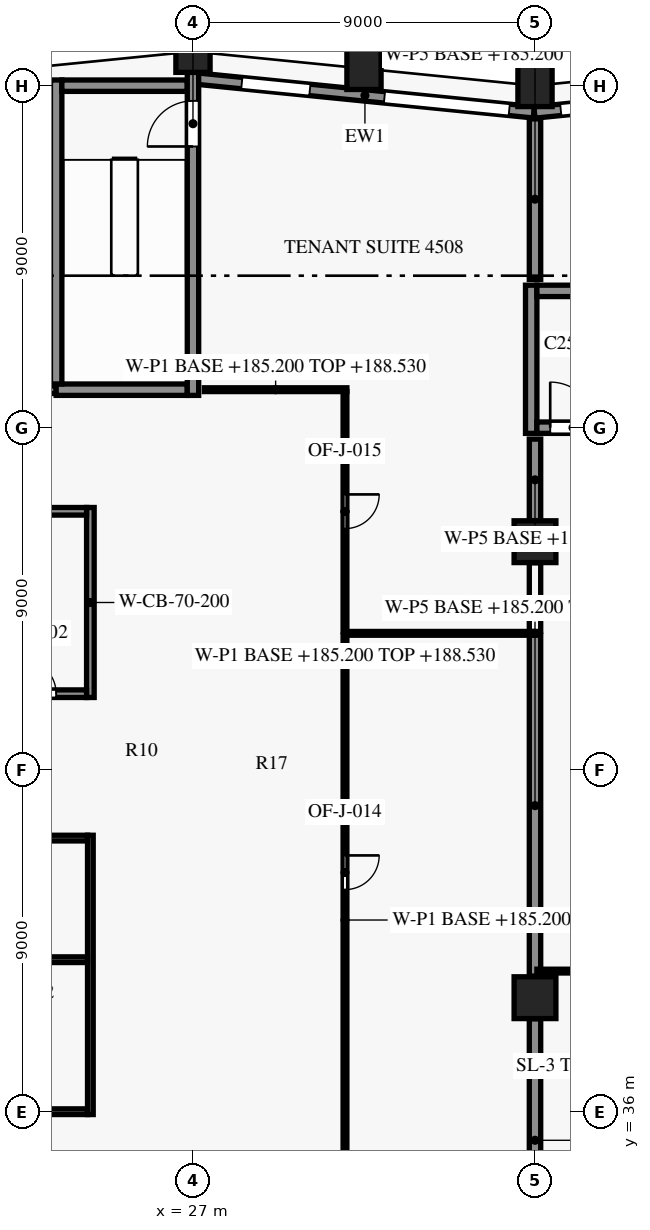
"""IFC4 building model, lengths in metres.
Left out: names, types, materials, properties, quantities, classifications, styles, units other than length and angle.
Written with IfcOpenShell. Run it as: python <this file> out.ifc"""

import sys

from ifc_helpers import new_model, si_unit, direction, frame, frame_2d, origin, origin_2d, place, context, subcontext, project, spatial, rectangle, extrude, element, fill, save


model = new_model("IFC4")
c1 = context("Model", 3, precision=1e-05, world=origin(), true_north=direction((0.0, 1.0)))
c2 = subcontext(c1, "Body", "Model", "MODEL_VIEW")
j1 = project(units=[si_unit("LENGTHUNIT", "METRE"), si_unit("PLANEANGLEUNIT", "RADIAN")], contexts=[c1])
p1 = place(None, origin())
s1 = spatial("IfcSite", under=j1, at=p1, CompositionType="ELEMENT")
p2 = place(p1, origin())
s2 = spatial("IfcBuilding", under=s1, at=p2, CompositionType="ELEMENT")
p3 = place(p2, frame((0.0, 0.0, 185.2)))
s3 = spatial("IfcBuildingStorey", under=s2, at=p3, CompositionType="ELEMENT", Elevation=185.2)
for number, where, z_axis, x_axis in (
    (1, (36.0, 63.0, 0.0), (0.0, 0.0, 1.0), (-1.0, 0.0, 0.0)),
    (2, (31.5, 63.45, 0.0), (0.0, 0.0, 1.0), (-0.995, 0.1, 0.0)),
    (3, (27.0, 63.9, 0.0), (0.0, 0.0, 1.0), (-1.0, 0.0, 0.0)),
):
    element("IfcColumn", number, at=place(p3, frame(where, z_axis=z_axis, x_axis=x_axis)), inside=s3, PredefinedType="COLUMN", context=c2, shape_type="SweptSolid", body=[
        extrude(rectangle(XDim=0.9, YDim=1.1, at=origin_2d()), origin(), (0.0, 0.0, 1.0), 3.8),
    ])
for number, where, z_axis, x_axis in (
    (4, (36.0, 39.0, 0.0), (0.0, 0.0, 1.0), (1.0, 0.0, 0.0)),
    (5, (36.0, 51.0, 0.0), (0.0, 0.0, 1.0), (1.0, 0.0, 0.0)),
):
    element("IfcColumn", number, at=place(p3, frame(where, z_axis=z_axis, x_axis=x_axis)), inside=s3, PredefinedType="COLUMN", context=c2, shape_type="SweptSolid", body=[
        extrude(rectangle(XDim=1.1, YDim=1.1, at=origin_2d()), origin(), (0.0, 0.0, 1.0), 3.8),
    ])
p4 = place(p3, frame((35.985, 62.295, 0.0), z_axis=(0.0, 0.0, 1.0), x_axis=(0.995035316196, 0.099522457379, 0.0)))
e6 = element("IfcWall", 6, at=p4, inside=s3, PredefinedType="SOLIDWALL", context=c2, shape_type="SweptSolid", body=[
    extrude(rectangle(XDim=9.03, YDim=0.3, at=frame_2d((4.515, 0.0))), origin(), (0.0, 0.0, 1.0), 3.15),
])
p5 = place(p4, frame((0.696, 0.0, 0.15)))
e7 = element("IfcOpeningElement", 7, at=p5, cuts=e6, PredefinedType="OPENING", context=c2, shape_type="SweptSolid", body=[
    extrude(rectangle(XDim=3.3, YDim=2.4, at=frame_2d((1.65, 1.2))), frame((0.0, 0.16, 0.0), z_axis=(0.0, -1.0, 0.0), x_axis=(1.0, 0.0, 0.0)), (0.0, 0.0, 1.0), 0.32),
])
p6 = place(p4, frame((5.969, 0.0, 0.75)))
e8 = element("IfcOpeningElement", 8, at=p6, cuts=e6, PredefinedType="OPENING", context=c2, shape_type="SweptSolid", body=[
    extrude(rectangle(XDim=1.8, YDim=1.8, at=frame_2d((0.9, 0.9))), frame((0.0, 0.16, 0.0), z_axis=(0.0, -1.0, 0.0), x_axis=(1.0, 0.0, 0.0)), (0.0, 0.0, 1.0), 0.32),
])
p7 = place(p3, frame((27.08, 63.189, 0.0), z_axis=(0.0, 0.0, 1.0), x_axis=(0.995036108007, -0.099514540459, 0.0)))
e9 = element("IfcWall", 9, at=p7, inside=s3, PredefinedType="SOLIDWALL", context=c2, shape_type="SweptSolid", body=[
    extrude(rectangle(XDim=8.935, YDim=0.3, at=frame_2d((4.468, 0.0))), origin(), (0.0, 0.0, 1.0), 3.15),
])
p8 = place(p7, frame((1.211, 0.0, 0.75)))
e10 = element("IfcOpeningElement", 10, at=p8, cuts=e9, PredefinedType="OPENING", context=c2, shape_type="SweptSolid", body=[
    extrude(rectangle(XDim=1.8, YDim=1.8, at=frame_2d((0.9, 0.9))), frame((0.0, 0.16, 0.0), z_axis=(0.0, -1.0, 0.0), x_axis=(1.0, 0.0, 0.0)), (0.0, 0.0, 1.0), 0.32),
])
p9 = place(p7, frame((4.984, 0.0, 0.15)))
e11 = element("IfcOpeningElement", 11, at=p9, cuts=e9, PredefinedType="OPENING", context=c2, shape_type="SweptSolid", body=[
    extrude(rectangle(XDim=3.3, YDim=2.4, at=frame_2d((1.65, 1.2))), frame((0.0, 0.16, 0.0), z_axis=(0.0, -1.0, 0.0), x_axis=(1.0, 0.0, 0.0)), (0.0, 0.0, 1.0), 0.32),
])
p10 = place(p3, frame((12.4, 36.0, 0.0), z_axis=(0.0, 0.0, 1.0), x_axis=(1.0, 0.0, 0.0)))
e12 = element("IfcWall", 12, at=p10, inside=s3, PredefinedType="SHEAR", context=c2, shape_type="SweptSolid", body=[
    extrude(rectangle(XDim=11.825, YDim=0.15, at=frame_2d((5.913, 0.0))), origin(), (0.0, 0.0, 1.0), 3.5),
])
p11 = place(p10, frame((0.95, 0.0, 0.0)))
e13 = element("IfcOpeningElement", 13, at=p11, cuts=e12, PredefinedType="OPENING", context=c2, shape_type="SweptSolid", body=[
    extrude(rectangle(XDim=0.9, YDim=2.1, at=frame_2d((0.45, 1.05))), frame((0.0, 0.085, 0.0), z_axis=(0.0, -1.0, 0.0), x_axis=(1.0, 0.0, 0.0)), (0.0, 0.0, 1.0), 0.17),
])
p12 = place(p10, frame((3.75, 0.0, 0.0)))
e14 = element("IfcOpeningElement", 14, at=p12, cuts=e12, PredefinedType="OPENING", context=c2, shape_type="SweptSolid", body=[
    extrude(rectangle(XDim=0.9, YDim=2.1, at=frame_2d((0.45, 1.05))), frame((0.0, 0.085, 0.0), z_axis=(0.0, -1.0, 0.0), x_axis=(1.0, 0.0, 0.0)), (0.0, 0.0, 1.0), 0.17),
])
p13 = place(p10, frame((6.325, 0.0, 0.0)))
e15 = element("IfcOpeningElement", 15, at=p13, cuts=e12, PredefinedType="OPENING", context=c2, shape_type="SweptSolid", body=[
    extrude(rectangle(XDim=0.95, YDim=2.1, at=frame_2d((0.475, 1.05))), frame((0.0, 0.085, 0.0), z_axis=(0.0, -1.0, 0.0), x_axis=(1.0, 0.0, 0.0)), (0.0, 0.0, 1.0), 0.17),
])
p14 = place(p10, frame((9.5, 0.0, 0.0)))
e16 = element("IfcOpeningElement", 16, at=p14, cuts=e12, PredefinedType="OPENING", context=c2, shape_type="SweptSolid", body=[
    extrude(rectangle(XDim=0.9, YDim=2.1, at=frame_2d((0.45, 1.05))), frame((0.0, 0.085, 0.0), z_axis=(0.0, -1.0, 0.0), x_axis=(1.0, 0.0, 0.0)), (0.0, 0.0, 1.0), 0.17),
])
p15 = place(p3, frame((8.1, 40.0, 0.0), z_axis=(0.0, 0.0, 1.0), x_axis=(1.0, 0.0, 0.0)))
e17 = element("IfcWall", 17, at=p15, inside=s3, PredefinedType="PARTITIONING", context=c2, shape_type="SweptSolid", body=[
    extrude(rectangle(XDim=16.125, YDim=0.15, at=frame_2d((8.062, 0.0))), origin(), (0.0, 0.0, 1.0), 3.5),
])
p16 = place(p3, frame((8.1, 43.2, 0.0), z_axis=(0.0, 0.0, 1.0), x_axis=(1.0, 0.0, 0.0)))
e18 = element("IfcWall", 18, at=p16, inside=s3, PredefinedType="PARTITIONING", context=c2, shape_type="SweptSolid", body=[
    extrude(rectangle(XDim=16.125, YDim=0.15, at=frame_2d((8.062, 0.0))), origin(), (0.0, 0.0, 1.0), 3.5),
])
p17 = place(p16, frame((1.925, 0.0, 0.0)))
e19 = element("IfcOpeningElement", 19, at=p17, cuts=e18, PredefinedType="OPENING", context=c2, shape_type="SweptSolid", body=[
    extrude(rectangle(XDim=0.9, YDim=2.1, at=frame_2d((0.45, 1.05))), frame((0.0, 0.085, 0.0), z_axis=(0.0, -1.0, 0.0), x_axis=(1.0, 0.0, 0.0)), (0.0, 0.0, 1.0), 0.17),
])
p18 = place(p16, frame((10.025, 0.0, 0.0)))
e20 = element("IfcOpeningElement", 20, at=p18, cuts=e18, PredefinedType="OPENING", context=c2, shape_type="SweptSolid", body=[
    extrude(rectangle(XDim=0.9, YDim=2.1, at=frame_2d((0.45, 1.05))), frame((0.0, 0.085, 0.0), z_axis=(0.0, -1.0, 0.0), x_axis=(1.0, 0.0, 0.0)), (0.0, 0.0, 1.0), 0.17),
])
p19 = place(p3, frame((21.6, 47.0, 0.0), z_axis=(0.0, 0.0, 1.0), x_axis=(1.0, 0.0, 0.0)))
e21 = element("IfcWall", 21, at=p19, inside=s3, PredefinedType="PARTITIONING", context=c2, shape_type="SweptSolid", body=[
    extrude(rectangle(XDim=2.6, YDim=0.2, at=frame_2d((1.3, 0.0))), origin(), (0.0, 0.0, 1.0), 3.5),
])
p20 = place(p19, frame((0.9, 0.0, 0.0)))
e22 = element("IfcOpeningElement", 22, at=p20, cuts=e21, PredefinedType="OPENING", context=c2, shape_type="SweptSolid", body=[
    extrude(rectangle(XDim=0.9, YDim=2.1, at=frame_2d((0.45, 1.05))), frame((0.0, 0.11, 0.0), z_axis=(0.0, -1.0, 0.0), x_axis=(1.0, 0.0, 0.0)), (0.0, 0.0, 1.0), 0.22),
])
p21 = place(p3, frame((21.6, 51.8, 0.0), z_axis=(0.0, 0.0, 1.0), x_axis=(1.0, 0.0, 0.0)))
e23 = element("IfcWall", 23, at=p21, inside=s3, PredefinedType="PARTITIONING", context=c2, shape_type="SweptSolid", body=[
    extrude(rectangle(XDim=2.6, YDim=0.2, at=frame_2d((1.3, 0.0))), origin(), (0.0, 0.0, 1.0), 3.5),
])
p22 = place(p3, frame((36.05, 54.0, 0.0), z_axis=(0.0, 0.0, 1.0), x_axis=(1.0, 0.0, 0.0)))
e24 = element("IfcWall", 24, at=p22, inside=s3, PredefinedType="SHEAR", context=c2, shape_type="SweptSolid", body=[
    extrude(rectangle(XDim=7.7, YDim=0.3, at=frame_2d((3.85, 0.0))), origin(), (0.0, 0.0, 1.0), 3.5),
])
p23 = place(p22, frame((0.35, 0.0, 0.0)))
e25 = element("IfcOpeningElement", 25, at=p23, cuts=e24, PredefinedType="OPENING", context=c2, shape_type="SweptSolid", body=[
    extrude(rectangle(XDim=1.2, YDim=2.2, at=frame_2d((0.6, 1.1))), frame((0.0, 0.16, 0.0), z_axis=(0.0, -1.0, 0.0), x_axis=(1.0, 0.0, 0.0)), (0.0, 0.0, 1.0), 0.32),
])
p24 = place(p3, frame((16.15, 55.0, 0.0), z_axis=(0.0, 0.0, 1.0), x_axis=(1.0, 0.0, 0.0)))
e26 = element("IfcWall", 26, at=p24, inside=s3, PredefinedType="PARTITIONING", context=c2, shape_type="SweptSolid", body=[
    extrude(rectangle(XDim=7.25, YDim=0.2, at=frame_2d((3.625, 0.0))), origin(), (0.0, 0.0, 1.0), 3.5),
])
p25 = place(p24, frame((3.125, 0.0, 0.0)))
e27 = element("IfcOpeningElement", 27, at=p25, cuts=e26, PredefinedType="OPENING", context=c2, shape_type="SweptSolid", body=[
    extrude(rectangle(XDim=1.0, YDim=2.1, at=frame_2d((0.5, 1.05))), frame((0.0, 0.11, 0.0), z_axis=(0.0, -1.0, 0.0), x_axis=(1.0, 0.0, 0.0)), (0.0, 0.0, 1.0), 0.22),
])
p26 = place(p3, frame((23.4, 55.0, 0.0), z_axis=(0.0, 0.0, 1.0), x_axis=(1.0, 0.0, 0.0)))
e28 = element("IfcWall", 28, at=p26, inside=s3, PredefinedType="SHEAR", context=c2, shape_type="SweptSolid", body=[
    extrude(rectangle(XDim=3.45, YDim=0.3, at=frame_2d((1.725, 0.0))), origin(), (0.0, 0.0, 1.0), 3.5),
])
p27 = place(p3, frame((36.05, 57.6, 0.0), z_axis=(0.0, 0.0, 1.0), x_axis=(1.0, 0.0, 0.0)))
e29 = element("IfcWall", 29, at=p27, inside=s3, PredefinedType="SHEAR", context=c2, shape_type="SweptSolid", body=[
    extrude(rectangle(XDim=7.7, YDim=0.3, at=frame_2d((3.85, 0.0))), origin(), (0.0, 0.0, 1.0), 3.5),
])
p28 = place(p3, frame((23.55, 63.0, 0.0), z_axis=(0.0, 0.0, 1.0), x_axis=(1.0, 0.0, 0.0)))
e30 = element("IfcWall", 30, at=p28, inside=s3, PredefinedType="SHEAR", context=c2, shape_type="SweptSolid", body=[
    extrude(rectangle(XDim=3.3, YDim=0.3, at=frame_2d((1.65, 0.0))), origin(), (0.0, 0.0, 1.0), 3.5),
])
p29 = place(p3, frame((23.4, 55.15, 0.0), z_axis=(0.0, 0.0, 1.0), x_axis=(0.0, 1.0, 0.0)))
e31 = element("IfcWall", 31, at=p29, inside=s3, PredefinedType="SHEAR", context=c2, shape_type="SweptSolid", body=[
    extrude(rectangle(XDim=8.0, YDim=0.3, at=frame_2d((4.0, 0.0))), origin(), (0.0, 0.0, 1.0), 3.5),
])
p30 = place(p3, frame((24.3, 35.925, 0.0), z_axis=(0.0, 0.0, 1.0), x_axis=(0.0, 1.0, 0.0)))
e32 = element("IfcWall", 32, at=p30, inside=s3, PredefinedType="PARTITIONING", context=c2, shape_type="SweptSolid", body=[
    extrude(rectangle(XDim=7.35, YDim=0.15, at=frame_2d((3.675, 0.0))), origin(), (0.0, 0.0, 1.0), 3.5),
])
p31 = place(p3, frame((24.3, 46.9, 0.0), z_axis=(0.0, 0.0, 1.0), x_axis=(0.0, 1.0, 0.0)))
e33 = element("IfcWall", 33, at=p31, inside=s3, PredefinedType="SHEAR", context=c2, shape_type="SweptSolid", body=[
    extrude(rectangle(XDim=5.0, YDim=0.2, at=frame_2d((2.5, 0.0))), origin(), (0.0, 0.0, 1.0), 3.5),
])
p32 = place(p3, frame((27.0, 54.85, 0.0), z_axis=(0.0, 0.0, 1.0), x_axis=(0.0, 1.0, 0.0)))
e34 = element("IfcWall", 34, at=p32, inside=s3, PredefinedType="SHEAR", context=c2, shape_type="SweptSolid", body=[
    extrude(rectangle(XDim=8.5, YDim=0.3, at=frame_2d((4.25, 0.0))), origin(), (0.0, 0.0, 1.0), 3.5),
])
p33 = place(p32, frame((6.55, 0.0, 0.0)))
e35 = element("IfcOpeningElement", 35, at=p33, cuts=e34, PredefinedType="OPENING", context=c2, shape_type="SweptSolid", body=[
    extrude(rectangle(XDim=1.2, YDim=2.2, at=frame_2d((0.6, 1.1))), frame((0.0, 0.16, 0.0), z_axis=(0.0, -1.0, 0.0), x_axis=(1.0, 0.0, 0.0)), (0.0, 0.0, 1.0), 0.32),
])
p34 = place(p3, frame((35.9, 53.85, 0.0), z_axis=(0.0, 0.0, 1.0), x_axis=(0.0, 1.0, 0.0)))
e36 = element("IfcWall", 36, at=p34, inside=s3, PredefinedType="SHEAR", context=c2, shape_type="SweptSolid", body=[
    extrude(rectangle(XDim=3.9, YDim=0.3, at=frame_2d((1.95, 0.0))), origin(), (0.0, 0.0, 1.0), 3.5),
])
p35 = place(p3, frame((36.0, 32.05, 0.0), z_axis=(0.0, 0.0, 1.0), x_axis=(0.0, 1.0, 0.0)))
e37 = element("IfcWall", 37, at=p35, inside=s3, PredefinedType="PARTITIONING", context=c2, shape_type="SweptSolid", body=[
    extrude(rectangle(XDim=6.395, YDim=0.3, at=frame_2d((3.198, 0.0))), origin(), (0.0, 0.0, 1.0), 2.63),
])
p36 = place(p3, frame((45.0, 39.7, 0.0), z_axis=(0.0, 0.0, 1.0), x_axis=(-1.0, 0.0, 0.0)))
e38 = element("IfcWall", 38, at=p36, inside=s3, PredefinedType="PARTITIONING", context=c2, shape_type="SweptSolid", body=[
    extrude(rectangle(XDim=8.95, YDim=0.1, at=frame_2d((4.475, 0.0))), origin(), (0.0, 0.0, 1.0), 2.63),
])
p37 = place(p36, frame((4.05, 0.0, 0.0)))
e39 = element("IfcOpeningElement", 39, at=p37, cuts=e38, PredefinedType="OPENING", context=c2, shape_type="SweptSolid", body=[
    extrude(rectangle(XDim=0.9, YDim=2.1, at=frame_2d((0.45, 1.05))), frame((0.0, 0.06, 0.0), z_axis=(0.0, -1.0, 0.0), x_axis=(1.0, 0.0, 0.0)), (0.0, 0.0, 1.0), 0.12),
])
p38 = place(p3, frame((36.0, 39.57, 0.0), z_axis=(0.0, 0.0, 1.0), x_axis=(0.0, 1.0, 0.0)))
e40 = element("IfcWall", 40, at=p38, inside=s3, PredefinedType="PARTITIONING", context=c2, shape_type="SweptSolid", body=[
    extrude(rectangle(XDim=8.968, YDim=0.3, at=frame_2d((4.484, 0.0))), origin(), (0.0, 0.0, 1.0), 2.63),
])
p39 = place(p3, frame((31.0, 48.538, 0.0), z_axis=(0.0, 0.0, 1.0), x_axis=(0.0, -1.0, 0.0)))
e41 = element("IfcWall", 41, at=p39, inside=s3, PredefinedType="PARTITIONING", context=c2, shape_type="SweptSolid", body=[
    extrude(rectangle(XDim=14.988, YDim=0.1, at=frame_2d((7.494, 0.0))), origin(), (0.0, 0.0, 1.0), 3.33),
])
p40 = place(p39, frame((5.794, 0.0, 0.0)))
e42 = element("IfcOpeningElement", 42, at=p40, cuts=e41, PredefinedType="OPENING", context=c2, shape_type="SweptSolid", body=[
    extrude(rectangle(XDim=0.9, YDim=2.1, at=frame_2d((0.45, 1.05))), frame((0.0, 0.06, 0.0), z_axis=(0.0, -1.0, 0.0), x_axis=(1.0, 0.0, 0.0)), (0.0, 0.0, 1.0), 0.12),
])
p41 = place(p3, frame((31.05, 48.588, 0.0), z_axis=(0.0, 0.0, 1.0), x_axis=(1.0, 0.0, 0.0)))
e43 = element("IfcWall", 43, at=p41, inside=s3, PredefinedType="PARTITIONING", context=c2, shape_type="SweptSolid", body=[
    extrude(rectangle(XDim=4.9, YDim=0.1, at=frame_2d((2.45, 0.0))), origin(), (0.0, 0.0, 1.0), 2.63),
])
p42 = place(p3, frame((36.0, 48.638, 0.0), z_axis=(0.0, 0.0, 1.0), x_axis=(0.0, 1.0, 0.0)))
e44 = element("IfcWall", 44, at=p42, inside=s3, PredefinedType="PARTITIONING", context=c2, shape_type="SweptSolid", body=[
    extrude(rectangle(XDim=1.807, YDim=0.3, at=frame_2d((0.904, 0.0))), origin(), (0.0, 0.0, 1.0), 2.63),
])
p43 = place(p3, frame((36.0, 51.555, 0.0), z_axis=(0.0, 0.0, 1.0), x_axis=(0.0, 1.0, 0.0)))
e45 = element("IfcWall", 45, at=p43, inside=s3, PredefinedType="PARTITIONING", context=c2, shape_type="SweptSolid", body=[
    extrude(rectangle(XDim=2.145, YDim=0.3, at=frame_2d((1.073, 0.0))), origin(), (0.0, 0.0, 1.0), 2.63),
])
p44 = place(p3, frame((31.0, 54.95, 0.0), z_axis=(0.0, 0.0, 1.0), x_axis=(0.0, -1.0, 0.0)))
e46 = element("IfcWall", 46, at=p44, inside=s3, PredefinedType="PARTITIONING", context=c2, shape_type="SweptSolid", body=[
    extrude(rectangle(XDim=6.312, YDim=0.1, at=frame_2d((3.156, 0.0))), origin(), (0.0, 0.0, 1.0), 3.33),
])
p45 = place(p44, frame((2.706, 0.0, 0.0)))
e47 = element("IfcOpeningElement", 47, at=p45, cuts=e46, PredefinedType="OPENING", context=c2, shape_type="SweptSolid", body=[
    extrude(rectangle(XDim=0.9, YDim=2.1, at=frame_2d((0.45, 1.05))), frame((0.0, 0.06, 0.0), z_axis=(0.0, -1.0, 0.0), x_axis=(1.0, 0.0, 0.0)), (0.0, 0.0, 1.0), 0.12),
])
p46 = place(p3, frame((27.3, 55.0, 0.0), z_axis=(0.0, 0.0, 1.0), x_axis=(1.0, 0.0, 0.0)))
e48 = element("IfcWall", 48, at=p46, inside=s3, PredefinedType="PARTITIONING", context=c2, shape_type="SweptSolid", body=[
    extrude(rectangle(XDim=3.75, YDim=0.1, at=frame_2d((1.875, 0.0))), origin(), (0.0, 0.0, 1.0), 3.33),
])
p47 = place(p3, frame((36.0, 57.9, 0.0), z_axis=(0.0, 0.0, 1.0), x_axis=(0.0, 1.0, 0.0)))
e49 = element("IfcWall", 49, at=p47, inside=s3, PredefinedType="PARTITIONING", context=c2, shape_type="SweptSolid", body=[
    extrude(rectangle(XDim=4.226, YDim=0.3, at=frame_2d((2.113, 0.0))), origin(), (0.0, 0.0, 1.0), 2.63),
])
p48 = place(p5, origin())
e50 = element("IfcWindow", 50, at=p48, inside=s3, PartitioningType="SINGLE_PANEL", PredefinedType="WINDOW", context=c2, shape_type="SweptSolid", body=[
    extrude(rectangle(XDim=3.3, YDim=2.4, at=frame_2d((1.65, 1.2))), frame((0.0, 0.03, 0.0), z_axis=(0.0, -1.0, 0.0), x_axis=(1.0, 0.0, 0.0)), (0.0, 0.0, 1.0), 0.06),
])
fill(e7, e50)
p49 = place(p8, origin())
e51 = element("IfcWindow", 51, at=p49, inside=s3, PartitioningType="SINGLE_PANEL", PredefinedType="WINDOW", context=c2, shape_type="SweptSolid", body=[
    extrude(rectangle(XDim=1.8, YDim=1.8, at=frame_2d((0.9, 0.9))), frame((0.0, 0.03, 0.0), z_axis=(0.0, -1.0, 0.0), x_axis=(1.0, 0.0, 0.0)), (0.0, 0.0, 1.0), 0.06),
])
fill(e10, e51)
p50 = place(p9, origin())
e52 = element("IfcWindow", 52, at=p50, inside=s3, PartitioningType="SINGLE_PANEL", PredefinedType="WINDOW", context=c2, shape_type="SweptSolid", body=[
    extrude(rectangle(XDim=3.3, YDim=2.4, at=frame_2d((1.65, 1.2))), frame((0.0, 0.03, 0.0), z_axis=(0.0, -1.0, 0.0), x_axis=(1.0, 0.0, 0.0)), (0.0, 0.0, 1.0), 0.06),
])
fill(e11, e52)
p51 = place(p20, origin())
e53 = element("IfcDoor", 53, at=p51, inside=s3, OperationType="SINGLE_SWING_LEFT", PredefinedType="DOOR", context=c2, shape_type="SweptSolid", body=[
    extrude(rectangle(XDim=0.9, YDim=2.1, at=frame_2d((0.45, 1.05))), frame((0.0, 0.025, 0.0), z_axis=(0.0, -1.0, 0.0), x_axis=(1.0, 0.0, 0.0)), (0.0, 0.0, 1.0), 0.05),
])
fill(e22, e53)
p52 = place(p33, origin())
e54 = element("IfcDoor", 54, at=p52, inside=s3, OperationType="SINGLE_SWING_LEFT", PredefinedType="DOOR", context=c2, shape_type="SweptSolid", body=[
    extrude(rectangle(XDim=1.2, YDim=2.2, at=frame_2d((0.6, 1.1))), frame((0.0, 0.025, 0.0), z_axis=(0.0, -1.0, 0.0), x_axis=(1.0, 0.0, 0.0)), (0.0, 0.0, 1.0), 0.05),
])
fill(e35, e54)
p53 = place(p23, origin())
e55 = element("IfcDoor", 55, at=p53, inside=s3, OperationType="SINGLE_SWING_LEFT", PredefinedType="DOOR", context=c2, shape_type="SweptSolid", body=[
    extrude(rectangle(XDim=1.2, YDim=2.2, at=frame_2d((0.6, 1.1))), frame((0.0, 0.025, 0.0), z_axis=(0.0, -1.0, 0.0), x_axis=(1.0, 0.0, 0.0)), (0.0, 0.0, 1.0), 0.05),
])
fill(e25, e55)
p54 = place(p40, origin())
e56 = element("IfcDoor", 56, at=p54, inside=s3, OperationType="SINGLE_SWING_RIGHT", PredefinedType="DOOR", context=c2, shape_type="SweptSolid", body=[
    extrude(rectangle(XDim=0.9, YDim=2.1, at=frame_2d((0.45, 1.05))), frame((0.0, 0.025, 0.0), z_axis=(0.0, -1.0, 0.0), x_axis=(1.0, 0.0, 0.0)), (0.0, 0.0, 1.0), 0.05),
])
fill(e42, e56)
p55 = place(p45, origin())
e57 = element("IfcDoor", 57, at=p55, inside=s3, OperationType="SINGLE_SWING_LEFT", PredefinedType="DOOR", context=c2, shape_type="SweptSolid", body=[
    extrude(rectangle(XDim=0.9, YDim=2.1, at=frame_2d((0.45, 1.05))), frame((0.0, 0.025, 0.0), z_axis=(0.0, -1.0, 0.0), x_axis=(1.0, 0.0, 0.0)), (0.0, 0.0, 1.0), 0.05),
])
fill(e47, e57)
save(model, sys.argv[1])
